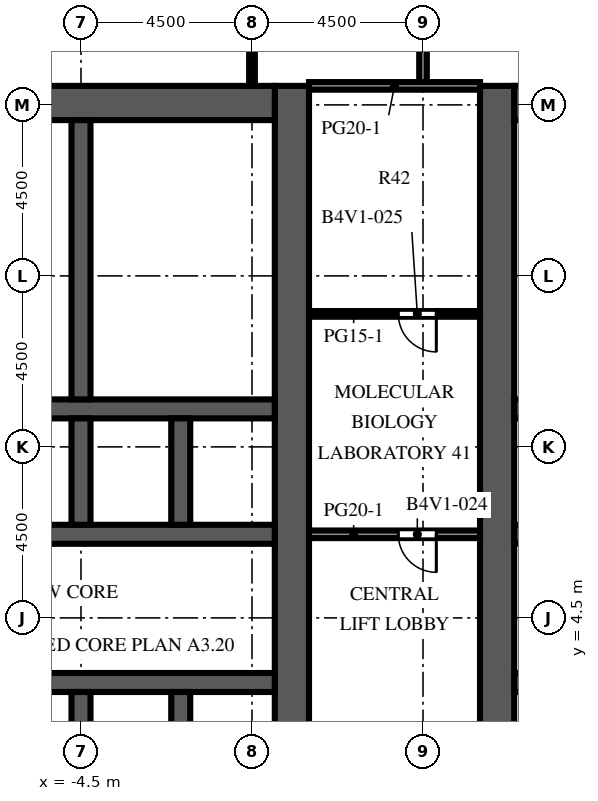
"""IFC4 building model, lengths in metres.
Left out: names, types, materials, properties, quantities, classifications, styles, units other than length and angle.
Written with IfcOpenShell. Run it as: python <this file> out.ifc"""

import sys

from ifc_helpers import new_model, si_unit, direction, frame, frame_2d, origin, place, context, subcontext, project, spatial, rectangle, extrude, element, fill, save


model = new_model("IFC4")
c1 = context("Model", 3, precision=1e-05, world=origin(), true_north=direction((0.0, 1.0)))
c2 = subcontext(c1, "Body", "Model", "MODEL_VIEW")
j1 = project(units=[si_unit("LENGTHUNIT", "METRE"), si_unit("PLANEANGLEUNIT", "RADIAN")], contexts=[c1])
p1 = place(None, origin())
s1 = spatial("IfcSite", under=j1, at=p1, CompositionType="ELEMENT")
p2 = place(p1, origin())
s2 = spatial("IfcBuilding", under=s1, at=p2, CompositionType="ELEMENT")
p3 = place(p2, frame((0.0, 0.0, 124.9)))
s3 = spatial("IfcBuildingStorey", under=s2, at=p3, CompositionType="ELEMENT", Elevation=124.9)
p4 = place(p3, frame((1.05, -9.0, 0.0), z_axis=(0.0, 0.0, 1.0), x_axis=(0.0, 1.0, 0.0)))
e1 = element("IfcWall", 1, at=p4, inside=s3, PredefinedType="SHEAR", context=c2, shape_type="SweptSolid", body=[
    extrude(rectangle(XDim=27.5, YDim=0.9, at=frame_2d((13.75, 0.0))), origin(), (0.0, 0.0, 1.0), 4.1),
])
p5 = place(p4, frame((12.55, 0.0, 0.0)))
e2 = element("IfcOpeningElement", 2, at=p5, cuts=e1, PredefinedType="OPENING", context=c2, shape_type="SweptSolid", body=[
    extrude(rectangle(XDim=2.4, YDim=2.4, at=frame_2d((1.2, 1.2))), frame((0.0, 0.46, 0.0), z_axis=(0.0, -1.0, 0.0), x_axis=(1.0, 0.0, 0.0)), (0.0, 0.0, 1.0), 0.92),
])
p6 = place(p4, frame((3.975, 0.0, 0.0)))
e3 = element("IfcOpeningElement", 3, at=p6, cuts=e1, PredefinedType="OPENING", context=c2, shape_type="SweptSolid", body=[
    extrude(rectangle(XDim=1.2, YDim=2.1, at=frame_2d((0.6, 1.05))), frame((0.0, 0.46, 0.0), z_axis=(0.0, -1.0, 0.0), x_axis=(1.0, 0.0, 0.0)), (0.0, 0.0, 1.0), 0.92),
])
p7 = place(p4, frame((22.325, 0.0, 0.0)))
e4 = element("IfcOpeningElement", 4, at=p7, cuts=e1, PredefinedType="OPENING", context=c2, shape_type="SweptSolid", body=[
    extrude(rectangle(XDim=1.2, YDim=2.1, at=frame_2d((0.6, 1.05))), frame((0.0, 0.46, 0.0), z_axis=(0.0, -1.0, 0.0), x_axis=(1.0, 0.0, 0.0)), (0.0, 0.0, 1.0), 0.92),
])
p8 = place(p3, frame((-9.6, 18.05, 0.0), z_axis=(0.0, 0.0, 1.0), x_axis=(1.0, 0.0, 0.0)))
e5 = element("IfcWall", 5, at=p8, inside=s3, PredefinedType="SHEAR", context=c2, shape_type="SweptSolid", body=[
    extrude(rectangle(XDim=10.2, YDim=0.9, at=frame_2d((5.1, 0.0))), origin(), (0.0, 0.0, 1.0), 4.1),
])
p9 = place(p3, frame((-9.6, 2.8, 0.0), z_axis=(0.0, 0.0, 1.0), x_axis=(1.0, 0.0, 0.0)))
e6 = element("IfcWall", 6, at=p9, inside=s3, PredefinedType="SHEAR", context=c2, shape_type="SweptSolid", body=[
    extrude(rectangle(XDim=10.2, YDim=0.5, at=frame_2d((5.1, 0.0))), origin(), (0.0, 0.0, 1.0), 4.1),
])
p10 = place(p9, frame((0.562, 0.0, 0.0)))
e7 = element("IfcOpeningElement", 7, at=p10, cuts=e6, PredefinedType="OPENING", context=c2, shape_type="SweptSolid", body=[
    extrude(rectangle(XDim=1.1, YDim=2.1, at=frame_2d((0.55, 1.05))), frame((0.0, 0.26, 0.0), z_axis=(0.0, -1.0, 0.0), x_axis=(1.0, 0.0, 0.0)), (0.0, 0.0, 1.0), 0.52),
])
p11 = place(p9, frame((3.238, 0.0, 0.0)))
e8 = element("IfcOpeningElement", 8, at=p11, cuts=e6, PredefinedType="OPENING", context=c2, shape_type="SweptSolid", body=[
    extrude(rectangle(XDim=1.1, YDim=2.1, at=frame_2d((0.55, 1.05))), frame((0.0, 0.26, 0.0), z_axis=(0.0, -1.0, 0.0), x_axis=(1.0, 0.0, 0.0)), (0.0, 0.0, 1.0), 0.52),
])
p12 = place(p9, frame((8.538, 0.0, 0.0)))
e9 = element("IfcOpeningElement", 9, at=p12, cuts=e6, PredefinedType="OPENING", context=c2, shape_type="SweptSolid", body=[
    extrude(rectangle(XDim=1.1, YDim=2.1, at=frame_2d((0.55, 1.05))), frame((0.0, 0.26, 0.0), z_axis=(0.0, -1.0, 0.0), x_axis=(1.0, 0.0, 0.0)), (0.0, 0.0, 1.0), 0.52),
])
p13 = place(p3, frame((-9.6, 6.7, 0.0), z_axis=(0.0, 0.0, 1.0), x_axis=(1.0, 0.0, 0.0)))
e10 = element("IfcWall", 10, at=p13, inside=s3, PredefinedType="SHEAR", context=c2, shape_type="SweptSolid", body=[
    extrude(rectangle(XDim=10.2, YDim=0.5, at=frame_2d((5.1, 0.0))), origin(), (0.0, 0.0, 1.0), 4.1),
])
p14 = place(p13, frame((0.562, 0.0, 0.0)))
e11 = element("IfcOpeningElement", 11, at=p14, cuts=e10, PredefinedType="OPENING", context=c2, shape_type="SweptSolid", body=[
    extrude(rectangle(XDim=1.1, YDim=2.1, at=frame_2d((0.55, 1.05))), frame((0.0, 0.26, 0.0), z_axis=(0.0, -1.0, 0.0), x_axis=(1.0, 0.0, 0.0)), (0.0, 0.0, 1.0), 0.52),
])
p15 = place(p13, frame((3.288, 0.0, 0.0)))
e12 = element("IfcOpeningElement", 12, at=p15, cuts=e10, PredefinedType="OPENING", context=c2, shape_type="SweptSolid", body=[
    extrude(rectangle(XDim=1.0, YDim=2.1, at=frame_2d((0.5, 1.05))), frame((0.0, 0.26, 0.0), z_axis=(0.0, -1.0, 0.0), x_axis=(1.0, 0.0, 0.0)), (0.0, 0.0, 1.0), 0.52),
])
p16 = place(p13, frame((5.913, 0.0, 0.0)))
e13 = element("IfcOpeningElement", 13, at=p16, cuts=e10, PredefinedType="OPENING", context=c2, shape_type="SweptSolid", body=[
    extrude(rectangle(XDim=1.0, YDim=2.1, at=frame_2d((0.5, 1.05))), frame((0.0, 0.26, 0.0), z_axis=(0.0, -1.0, 0.0), x_axis=(1.0, 0.0, 0.0)), (0.0, 0.0, 1.0), 0.52),
])
p17 = place(p13, frame((8.587, 0.0, 0.0)))
e14 = element("IfcOpeningElement", 14, at=p17, cuts=e10, PredefinedType="OPENING", context=c2, shape_type="SweptSolid", body=[
    extrude(rectangle(XDim=1.0, YDim=2.1, at=frame_2d((0.5, 1.05))), frame((0.0, 0.26, 0.0), z_axis=(0.0, -1.0, 0.0), x_axis=(1.0, 0.0, 0.0)), (0.0, 0.0, 1.0), 0.52),
])
p18 = place(p3, frame((-9.6, 10.0, 0.0), z_axis=(0.0, 0.0, 1.0), x_axis=(1.0, 0.0, 0.0)))
e15 = element("IfcWall", 15, at=p18, inside=s3, PredefinedType="SHEAR", context=c2, shape_type="SweptSolid", body=[
    extrude(rectangle(XDim=10.2, YDim=0.5, at=frame_2d((5.1, 0.0))), origin(), (0.0, 0.0, 1.0), 4.1),
])
for number, where, z_axis, x_axis in (
    (16, (-4.5, -0.25, 0.0), (0.0, 0.0, 1.0), (0.0, 1.0, 0.0)),
    (17, (-4.5, 6.95, 0.0), (0.0, 0.0, 1.0), (0.0, 1.0, 0.0)),
    (18, (-1.875, -0.25, 0.0), (0.0, 0.0, 1.0), (0.0, 1.0, 0.0)),
    (19, (-1.875, 6.95, 0.0), (0.0, 0.0, 1.0), (0.0, 1.0, 0.0)),
):
    element("IfcWall", number, at=place(p3, frame(where, z_axis=z_axis, x_axis=x_axis)), inside=s3, PredefinedType="SHEAR", context=c2, shape_type="SweptSolid", body=[
        extrude(rectangle(XDim=2.8, YDim=0.5, at=frame_2d((1.4, 0.0))), origin(), (0.0, 0.0, 1.0), 4.1),
    ])
p19 = place(p3, frame((-4.5, 10.25, 0.0), z_axis=(0.0, 0.0, 1.0), x_axis=(0.0, 1.0, 0.0)))
e20 = element("IfcWall", 20, at=p19, inside=s3, PredefinedType="SHEAR", context=c2, shape_type="SweptSolid", body=[
    extrude(rectangle(XDim=7.35, YDim=0.5, at=frame_2d((3.675, 0.0))), origin(), (0.0, 0.0, 1.0), 4.1),
])
p20 = place(p3, frame((6.45, -9.0, 0.0), z_axis=(0.0, 0.0, 1.0), x_axis=(0.0, 1.0, 0.0)))
e21 = element("IfcWall", 21, at=p20, inside=s3, PredefinedType="SHEAR", context=c2, shape_type="SweptSolid", body=[
    extrude(rectangle(XDim=27.5, YDim=0.9, at=frame_2d((13.75, 0.0))), origin(), (0.0, 0.0, 1.0), 4.1),
])
p21 = place(p20, frame((12.55, 0.0, 0.0)))
e22 = element("IfcOpeningElement", 22, at=p21, cuts=e21, PredefinedType="OPENING", context=c2, shape_type="SweptSolid", body=[
    extrude(rectangle(XDim=2.4, YDim=2.4, at=frame_2d((1.2, 1.2))), frame((0.0, 0.46, 0.0), z_axis=(0.0, -1.0, 0.0), x_axis=(1.0, 0.0, 0.0)), (0.0, 0.0, 1.0), 0.92),
])
p22 = place(p20, frame((3.975, 0.0, 0.0)))
e23 = element("IfcOpeningElement", 23, at=p22, cuts=e21, PredefinedType="OPENING", context=c2, shape_type="SweptSolid", body=[
    extrude(rectangle(XDim=1.2, YDim=2.1, at=frame_2d((0.6, 1.05))), frame((0.0, 0.46, 0.0), z_axis=(0.0, -1.0, 0.0), x_axis=(1.0, 0.0, 0.0)), (0.0, 0.0, 1.0), 0.92),
])
p23 = place(p20, frame((22.325, 0.0, 0.0)))
e24 = element("IfcOpeningElement", 24, at=p23, cuts=e21, PredefinedType="OPENING", context=c2, shape_type="SweptSolid", body=[
    extrude(rectangle(XDim=1.2, YDim=2.1, at=frame_2d((0.6, 1.05))), frame((0.0, 0.46, 0.0), z_axis=(0.0, -1.0, 0.0), x_axis=(1.0, 0.0, 0.0)), (0.0, 0.0, 1.0), 0.92),
])
p24 = place(p3, frame((6.9, 18.05, 0.0), z_axis=(0.0, 0.0, 1.0), x_axis=(1.0, 0.0, 0.0)))
e25 = element("IfcWall", 25, at=p24, inside=s3, PredefinedType="SHEAR", context=c2, shape_type="SweptSolid", body=[
    extrude(rectangle(XDim=10.2, YDim=0.9, at=frame_2d((5.1, 0.0))), origin(), (0.0, 0.0, 1.0), 4.1),
])
p25 = place(p3, frame((6.9, 2.8, 0.0), z_axis=(0.0, 0.0, 1.0), x_axis=(1.0, 0.0, 0.0)))
e26 = element("IfcWall", 26, at=p25, inside=s3, PredefinedType="SHEAR", context=c2, shape_type="SweptSolid", body=[
    extrude(rectangle(XDim=10.2, YDim=0.5, at=frame_2d((5.1, 0.0))), origin(), (0.0, 0.0, 1.0), 4.1),
])
p26 = place(p25, frame((0.562, 0.0, 0.0)))
e27 = element("IfcOpeningElement", 27, at=p26, cuts=e26, PredefinedType="OPENING", context=c2, shape_type="SweptSolid", body=[
    extrude(rectangle(XDim=1.1, YDim=2.1, at=frame_2d((0.55, 1.05))), frame((0.0, 0.26, 0.0), z_axis=(0.0, -1.0, 0.0), x_axis=(1.0, 0.0, 0.0)), (0.0, 0.0, 1.0), 0.52),
])
p27 = place(p25, frame((3.238, 0.0, 0.0)))
e28 = element("IfcOpeningElement", 28, at=p27, cuts=e26, PredefinedType="OPENING", context=c2, shape_type="SweptSolid", body=[
    extrude(rectangle(XDim=1.1, YDim=2.1, at=frame_2d((0.55, 1.05))), frame((0.0, 0.26, 0.0), z_axis=(0.0, -1.0, 0.0), x_axis=(1.0, 0.0, 0.0)), (0.0, 0.0, 1.0), 0.52),
])
p28 = place(p25, frame((8.538, 0.0, 0.0)))
e29 = element("IfcOpeningElement", 29, at=p28, cuts=e26, PredefinedType="OPENING", context=c2, shape_type="SweptSolid", body=[
    extrude(rectangle(XDim=1.1, YDim=2.1, at=frame_2d((0.55, 1.05))), frame((0.0, 0.26, 0.0), z_axis=(0.0, -1.0, 0.0), x_axis=(1.0, 0.0, 0.0)), (0.0, 0.0, 1.0), 0.52),
])
p29 = place(p3, frame((6.9, 6.7, 0.0), z_axis=(0.0, 0.0, 1.0), x_axis=(1.0, 0.0, 0.0)))
e30 = element("IfcWall", 30, at=p29, inside=s3, PredefinedType="SHEAR", context=c2, shape_type="SweptSolid", body=[
    extrude(rectangle(XDim=10.2, YDim=0.5, at=frame_2d((5.1, 0.0))), origin(), (0.0, 0.0, 1.0), 4.1),
])
p30 = place(p29, frame((0.562, 0.0, 0.0)))
e31 = element("IfcOpeningElement", 31, at=p30, cuts=e30, PredefinedType="OPENING", context=c2, shape_type="SweptSolid", body=[
    extrude(rectangle(XDim=1.1, YDim=2.1, at=frame_2d((0.55, 1.05))), frame((0.0, 0.26, 0.0), z_axis=(0.0, -1.0, 0.0), x_axis=(1.0, 0.0, 0.0)), (0.0, 0.0, 1.0), 0.52),
])
p31 = place(p29, frame((3.288, 0.0, 0.0)))
e32 = element("IfcOpeningElement", 32, at=p31, cuts=e30, PredefinedType="OPENING", context=c2, shape_type="SweptSolid", body=[
    extrude(rectangle(XDim=1.0, YDim=2.1, at=frame_2d((0.5, 1.05))), frame((0.0, 0.26, 0.0), z_axis=(0.0, -1.0, 0.0), x_axis=(1.0, 0.0, 0.0)), (0.0, 0.0, 1.0), 0.52),
])
p32 = place(p29, frame((5.913, 0.0, 0.0)))
e33 = element("IfcOpeningElement", 33, at=p32, cuts=e30, PredefinedType="OPENING", context=c2, shape_type="SweptSolid", body=[
    extrude(rectangle(XDim=1.0, YDim=2.1, at=frame_2d((0.5, 1.05))), frame((0.0, 0.26, 0.0), z_axis=(0.0, -1.0, 0.0), x_axis=(1.0, 0.0, 0.0)), (0.0, 0.0, 1.0), 0.52),
])
p33 = place(p29, frame((8.587, 0.0, 0.0)))
e34 = element("IfcOpeningElement", 34, at=p33, cuts=e30, PredefinedType="OPENING", context=c2, shape_type="SweptSolid", body=[
    extrude(rectangle(XDim=1.0, YDim=2.1, at=frame_2d((0.5, 1.05))), frame((0.0, 0.26, 0.0), z_axis=(0.0, -1.0, 0.0), x_axis=(1.0, 0.0, 0.0)), (0.0, 0.0, 1.0), 0.52),
])
p34 = place(p3, frame((6.9, 10.0, 0.0), z_axis=(0.0, 0.0, 1.0), x_axis=(1.0, 0.0, 0.0)))
e35 = element("IfcWall", 35, at=p34, inside=s3, PredefinedType="SHEAR", context=c2, shape_type="SweptSolid", body=[
    extrude(rectangle(XDim=10.2, YDim=0.5, at=frame_2d((5.1, 0.0))), origin(), (0.0, 0.0, 1.0), 4.1),
])
p35 = place(p3, frame((-0.8, 10.25, 0.0), z_axis=(0.0, 0.0, 1.0), x_axis=(0.0, 1.0, 0.0)))
e36 = element("IfcWall", 36, at=p35, inside=s3, PredefinedType="PARTITIONING", context=c2, shape_type="SweptSolid", body=[
    extrude(rectangle(XDim=2.205, YDim=0.1, at=frame_2d((1.103, 0.0))), origin(), (0.0, 0.0, 1.0), 3.65),
])
p36 = place(p35, frame((0.603, 0.0, 0.0)))
e37 = element("IfcOpeningElement", 37, at=p36, cuts=e36, PredefinedType="OPENING", context=c2, shape_type="SweptSolid", body=[
    extrude(rectangle(XDim=1.0, YDim=2.1, at=frame_2d((0.5, 1.05))), frame((0.0, 0.06, 0.0), z_axis=(0.0, -1.0, 0.0), x_axis=(1.0, 0.0, 0.0)), (0.0, 0.0, 1.0), 0.12),
])
p37 = place(p3, frame((-0.8, 12.455, 0.0), z_axis=(0.0, 0.0, 1.0), x_axis=(0.0, 1.0, 0.0)))
e38 = element("IfcWall", 38, at=p37, inside=s3, PredefinedType="PARTITIONING", context=c2, shape_type="SweptSolid", body=[
    extrude(rectangle(XDim=2.352, YDim=0.1, at=frame_2d((1.176, 0.0))), origin(), (0.0, 0.0, 1.0), 3.65),
])
p38 = place(p37, frame((0.676, 0.0, 0.0)))
e39 = element("IfcOpeningElement", 39, at=p38, cuts=e38, PredefinedType="OPENING", context=c2, shape_type="SweptSolid", body=[
    extrude(rectangle(XDim=1.0, YDim=2.1, at=frame_2d((0.5, 1.05))), frame((0.0, 0.06, 0.0), z_axis=(0.0, -1.0, 0.0), x_axis=(1.0, 0.0, 0.0)), (0.0, 0.0, 1.0), 0.12),
])
p39 = place(p3, frame((-0.8, 14.807, 0.0), z_axis=(0.0, 0.0, 1.0), x_axis=(0.0, 1.0, 0.0)))
e40 = element("IfcWall", 40, at=p39, inside=s3, PredefinedType="PARTITIONING", context=c2, shape_type="SweptSolid", body=[
    extrude(rectangle(XDim=2.793, YDim=0.1, at=frame_2d((1.396, 0.0))), origin(), (0.0, 0.0, 1.0), 3.65),
])
p40 = place(p39, frame((0.896, 0.0, 0.0)))
e41 = element("IfcOpeningElement", 41, at=p40, cuts=e40, PredefinedType="OPENING", context=c2, shape_type="SweptSolid", body=[
    extrude(rectangle(XDim=1.0, YDim=2.1, at=frame_2d((0.5, 1.05))), frame((0.0, 0.06, 0.0), z_axis=(0.0, -1.0, 0.0), x_axis=(1.0, 0.0, 0.0)), (0.0, 0.0, 1.0), 0.12),
])
for number, where, z_axis, x_axis in (
    (42, (-4.25, 12.455, 0.0), (0.0, 0.0, 1.0), (1.0, 0.0, 0.0)),
    (43, (-4.25, 14.807, 0.0), (0.0, 0.0, 1.0), (1.0, 0.0, 0.0)),
):
    element("IfcWall", number, at=place(p3, frame(where, z_axis=z_axis, x_axis=x_axis)), inside=s3, PredefinedType="PARTITIONING", context=c2, shape_type="SweptSolid", body=[
        extrude(rectangle(XDim=3.45, YDim=0.1, at=frame_2d((1.725, 0.0))), origin(), (0.0, 0.0, 1.0), 3.65),
    ])
p41 = place(p3, frame((0.0, 18.5, 0.0), z_axis=(0.0, 0.0, 1.0), x_axis=(0.0, 1.0, 0.0)))
e44 = element("IfcWall", 44, at=p41, inside=s3, PredefinedType="PARTITIONING", context=c2, shape_type="SweptSolid", body=[
    extrude(rectangle(XDim=3.3, YDim=0.15, at=frame_2d((1.65, 0.0))), origin(), (0.0, 0.0, 1.0), 3.65),
])
p42 = place(p3, frame((4.5, 18.5, 0.0), z_axis=(0.0, 0.0, 1.0), x_axis=(0.0, 1.0, 0.0)))
e45 = element("IfcWall", 45, at=p42, inside=s3, PredefinedType="PARTITIONING", context=c2, shape_type="SweptSolid", body=[
    extrude(rectangle(XDim=12.4, YDim=0.2, at=frame_2d((6.2, 0.0))), origin(), (0.0, 0.0, 1.0), 3.65),
])
p43 = place(p3, frame((1.5, 6.7, 0.0), z_axis=(0.0, 0.0, 1.0), x_axis=(1.0, 0.0, 0.0)))
e46 = element("IfcWall", 46, at=p43, inside=s3, PredefinedType="PARTITIONING", context=c2, shape_type="SweptSolid", body=[
    extrude(rectangle(XDim=4.5, YDim=0.2, at=frame_2d((2.25, 0.0))), origin(), (0.0, 0.0, 1.0), 3.65),
])
p44 = place(p43, frame((2.35, 0.0, 0.0)))
e47 = element("IfcOpeningElement", 47, at=p44, cuts=e46, PredefinedType="OPENING", context=c2, shape_type="SweptSolid", body=[
    extrude(rectangle(XDim=1.0, YDim=2.1, at=frame_2d((0.5, 1.05))), frame((0.0, 0.11, 0.0), z_axis=(0.0, -1.0, 0.0), x_axis=(1.0, 0.0, 0.0)), (0.0, 0.0, 1.0), 0.22),
])
p45 = place(p3, frame((1.5, 12.5, 0.0), z_axis=(0.0, 0.0, 1.0), x_axis=(1.0, 0.0, 0.0)))
e48 = element("IfcWall", 48, at=p45, inside=s3, PredefinedType="PARTITIONING", context=c2, shape_type="SweptSolid", body=[
    extrude(rectangle(XDim=4.5, YDim=0.15, at=frame_2d((2.25, 0.0))), origin(), (0.0, 0.0, 1.0), 3.65),
])
p46 = place(p45, frame((2.35, 0.0, 0.0)))
e49 = element("IfcOpeningElement", 49, at=p46, cuts=e48, PredefinedType="OPENING", context=c2, shape_type="SweptSolid", body=[
    extrude(rectangle(XDim=1.0, YDim=2.1, at=frame_2d((0.5, 1.05))), frame((0.0, 0.085, 0.0), z_axis=(0.0, -1.0, 0.0), x_axis=(1.0, 0.0, 0.0)), (0.0, 0.0, 1.0), 0.17),
])
p47 = place(p3, frame((1.5, 18.5, 0.0), z_axis=(0.0, 0.0, 1.0), x_axis=(1.0, 0.0, 0.0)))
e50 = element("IfcWall", 50, at=p47, inside=s3, PredefinedType="PARTITIONING", context=c2, shape_type="SweptSolid", body=[
    extrude(rectangle(XDim=4.5, YDim=0.2, at=frame_2d((2.25, 0.0))), origin(), (0.0, 0.0, 1.0), 3.65),
])
p48 = place(p12, origin())
e51 = element("IfcDoor", 51, at=p48, inside=s3, OperationType="DOUBLE_DOOR_SLIDING", PredefinedType="DOOR", context=c2, shape_type="SweptSolid", body=[
    extrude(rectangle(XDim=1.1, YDim=2.1, at=frame_2d((0.55, 1.05))), frame((0.0, 0.025, 0.0), z_axis=(0.0, -1.0, 0.0), x_axis=(1.0, 0.0, 0.0)), (0.0, 0.0, 1.0), 0.05),
])
fill(e9, e51)
p49 = place(p5, origin())
e52 = element("IfcDoor", 52, at=p49, inside=s3, OperationType="DOUBLE_DOOR_DOUBLE_SWING", PredefinedType="DOOR", context=c2, shape_type="SweptSolid", body=[
    extrude(rectangle(XDim=2.4, YDim=2.4, at=frame_2d((1.2, 1.2))), frame((0.0, 0.025, 0.0), z_axis=(0.0, -1.0, 0.0), x_axis=(1.0, 0.0, 0.0)), (0.0, 0.0, 1.0), 0.05),
])
fill(e2, e52)
p50 = place(p21, origin())
e53 = element("IfcDoor", 53, at=p50, inside=s3, OperationType="DOUBLE_DOOR_DOUBLE_SWING", PredefinedType="DOOR", context=c2, shape_type="SweptSolid", body=[
    extrude(rectangle(XDim=2.4, YDim=2.4, at=frame_2d((1.2, 1.2))), frame((0.0, 0.025, 0.0), z_axis=(0.0, -1.0, 0.0), x_axis=(1.0, 0.0, 0.0)), (0.0, 0.0, 1.0), 0.05),
])
fill(e22, e53)
p51 = place(p16, origin())
e54 = element("IfcDoor", 54, at=p51, inside=s3, OperationType="SINGLE_SWING_LEFT", PredefinedType="DOOR", context=c2, shape_type="SweptSolid", body=[
    extrude(rectangle(XDim=1.0, YDim=2.1, at=frame_2d((0.5, 1.05))), frame((0.0, 0.025, 0.0), z_axis=(0.0, -1.0, 0.0), x_axis=(1.0, 0.0, 0.0)), (0.0, 0.0, 1.0), 0.05),
])
fill(e13, e54)
p52 = place(p17, origin())
e55 = element("IfcDoor", 55, at=p52, inside=s3, OperationType="SINGLE_SWING_RIGHT", PredefinedType="DOOR", context=c2, shape_type="SweptSolid", body=[
    extrude(rectangle(XDim=1.0, YDim=2.1, at=frame_2d((0.5, 1.05))), frame((0.0, 0.025, 0.0), z_axis=(0.0, -1.0, 0.0), x_axis=(1.0, 0.0, 0.0)), (0.0, 0.0, 1.0), 0.05),
])
fill(e14, e55)
p53 = place(p7, origin())
e56 = element("IfcDoor", 56, at=p53, inside=s3, OperationType="SINGLE_SWING_LEFT", PredefinedType="DOOR", context=c2, shape_type="SweptSolid", body=[
    extrude(rectangle(XDim=1.2, YDim=2.1, at=frame_2d((0.6, 1.05))), frame((0.0, 0.425, 0.0), z_axis=(0.0, -1.0, 0.0), x_axis=(1.0, 0.0, 0.0)), (0.0, 0.0, 1.0), 0.05),
])
fill(e4, e56)
p54 = place(p36, origin())
e57 = element("IfcDoor", 57, at=p54, inside=s3, OperationType="SINGLE_SWING_RIGHT", PredefinedType="DOOR", context=c2, shape_type="SweptSolid", body=[
    extrude(rectangle(XDim=1.0, YDim=2.1, at=frame_2d((0.5, 1.05))), frame((0.0, 0.025, 0.0), z_axis=(0.0, -1.0, 0.0), x_axis=(1.0, 0.0, 0.0)), (0.0, 0.0, 1.0), 0.05),
])
fill(e37, e57)
p55 = place(p38, origin())
e58 = element("IfcDoor", 58, at=p55, inside=s3, OperationType="SINGLE_SWING_LEFT", PredefinedType="DOOR", context=c2, shape_type="SweptSolid", body=[
    extrude(rectangle(XDim=1.0, YDim=2.1, at=frame_2d((0.5, 1.05))), frame((0.0, 0.025, 0.0), z_axis=(0.0, -1.0, 0.0), x_axis=(1.0, 0.0, 0.0)), (0.0, 0.0, 1.0), 0.05),
])
fill(e39, e58)
p56 = place(p40, origin())
e59 = element("IfcDoor", 59, at=p56, inside=s3, OperationType="SINGLE_SWING_RIGHT", PredefinedType="DOOR", context=c2, shape_type="SweptSolid", body=[
    extrude(rectangle(XDim=1.0, YDim=2.1, at=frame_2d((0.5, 1.05))), frame((0.0, 0.025, 0.0), z_axis=(0.0, -1.0, 0.0), x_axis=(1.0, 0.0, 0.0)), (0.0, 0.0, 1.0), 0.05),
])
fill(e41, e59)
p57 = place(p23, origin())
e60 = element("IfcDoor", 60, at=p57, inside=s3, OperationType="SINGLE_SWING_RIGHT", PredefinedType="DOOR", context=c2, shape_type="SweptSolid", body=[
    extrude(rectangle(XDim=1.2, YDim=2.1, at=frame_2d((0.6, 1.05))), frame((0.0, -0.375, 0.0), z_axis=(0.0, -1.0, 0.0), x_axis=(1.0, 0.0, 0.0)), (0.0, 0.0, 1.0), 0.05),
])
fill(e24, e60)
p58 = place(p44, origin())
e61 = element("IfcDoor", 61, at=p58, inside=s3, OperationType="SINGLE_SWING_RIGHT", PredefinedType="DOOR", context=c2, shape_type="SweptSolid", body=[
    extrude(rectangle(XDim=1.0, YDim=2.1, at=frame_2d((0.5, 1.05))), frame((0.0, 0.025, 0.0), z_axis=(0.0, -1.0, 0.0), x_axis=(1.0, 0.0, 0.0)), (0.0, 0.0, 1.0), 0.05),
])
fill(e47, e61)
p59 = place(p46, origin())
e62 = element("IfcDoor", 62, at=p59, inside=s3, OperationType="SINGLE_SWING_RIGHT", PredefinedType="DOOR", context=c2, shape_type="SweptSolid", body=[
    extrude(rectangle(XDim=1.0, YDim=2.1, at=frame_2d((0.5, 1.05))), frame((0.0, 0.025, 0.0), z_axis=(0.0, -1.0, 0.0), x_axis=(1.0, 0.0, 0.0)), (0.0, 0.0, 1.0), 0.05),
])
fill(e49, e62)
save(model, sys.argv[1])
